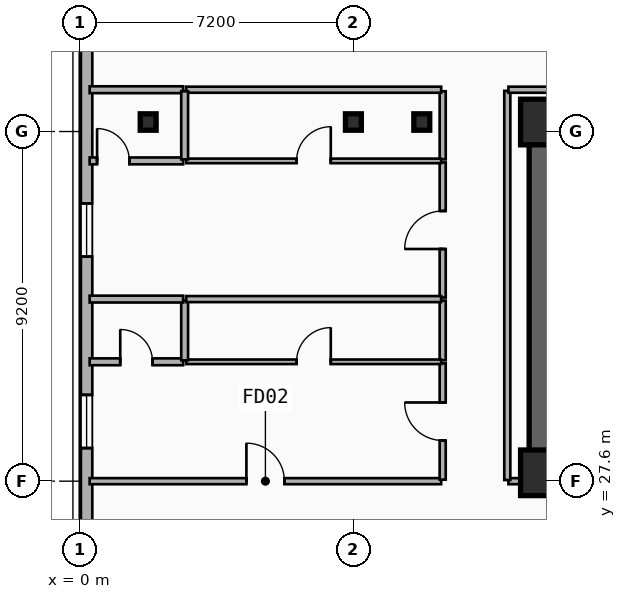
"""IFC4 building model, lengths in metres.
Left out: names, types, materials, properties, quantities, classifications, styles, units other than length and angle.
Written with IfcOpenShell. Run it as: python <this file> out.ifc"""

import sys

from ifc_helpers import new_model, si_unit, direction, frame, frame_2d, origin, origin_2d, place, context, subcontext, project, spatial, rectangle, i_section, extrude, element, fill, save


model = new_model("IFC4")
c1 = context("Model", 3, precision=1e-05, world=origin(), true_north=direction((0.0, 1.0)))
c2 = subcontext(c1, "Body", "Model", "MODEL_VIEW")
j1 = project(units=[si_unit("LENGTHUNIT", "METRE"), si_unit("PLANEANGLEUNIT", "RADIAN")], contexts=[c1])
p1 = place(None, origin())
s1 = spatial("IfcSite", under=j1, at=p1, CompositionType="ELEMENT")
p2 = place(p1, origin())
s2 = spatial("IfcBuilding", under=s1, at=p2, CompositionType="ELEMENT")
p3 = place(p2, frame((0.0, 0.0, 111.8)))
s3 = spatial("IfcBuildingStorey", under=s2, at=p3, CompositionType="ELEMENT", Elevation=111.8)
p4 = place(p3, frame((12.15, 37.05, 0.0), z_axis=(0.0, 0.0, 1.0), x_axis=(1.0, 0.0, 0.0)))
e1 = element("IfcWall", 1, at=p4, inside=s3, PredefinedType="SHEAR", context=c2, shape_type="SweptSolid", body=[
    extrude(rectangle(XDim=33.23, YDim=0.65, at=frame_2d((16.615, 0.0))), origin(), (0.0, 0.0, 1.0), 3.5),
])
p5 = place(p3, frame((21.18, 27.82, 0.0), z_axis=(0.0, 0.0, 1.0), x_axis=(-1.0, 0.0, 0.0)))
e2 = element("IfcWall", 2, at=p5, inside=s3, PredefinedType="SHEAR", context=c2, shape_type="SweptSolid", body=[
    extrude(rectangle(XDim=9.03, YDim=0.65, at=frame_2d((4.515, 0.0))), origin(), (0.0, 0.0, 1.0), 3.5),
])
p6 = place(p5, frame((2.68, 0.0, 0.0)))
e3 = element("IfcOpeningElement", 3, at=p6, cuts=e2, PredefinedType="OPENING", context=c2, shape_type="SweptSolid", body=[
    extrude(rectangle(XDim=1.1, YDim=2.15, at=frame_2d((0.55, 1.075))), frame((0.0, 0.335, 0.0), z_axis=(0.0, -1.0, 0.0), x_axis=(1.0, 0.0, 0.0)), (0.0, 0.0, 1.0), 0.67),
])
p7 = place(p3, frame((12.15, 28.145, 0.0), z_axis=(0.0, 0.0, 1.0), x_axis=(0.0, 1.0, 0.0)))
e4 = element("IfcWall", 4, at=p7, inside=s3, PredefinedType="SHEAR", context=c2, shape_type="SweptSolid", body=[
    extrude(rectangle(XDim=8.58, YDim=0.65, at=frame_2d((4.29, 0.0))), origin(), (0.0, 0.0, 1.0), 3.5),
])
for number, where, z_axis, x_axis in (
    (5, (12.2, 27.82, 0.0), (0.0, 0.0, 1.0), (1.0, 0.0, 0.0)),
    (6, (12.2, 37.05, 0.0), (0.0, 0.0, 1.0), (1.0, 0.0, 0.0)),
):
    element("IfcColumn", number, at=place(p3, frame(where, z_axis=z_axis, x_axis=x_axis)), inside=s3, PredefinedType="COLUMN", context=c2, shape_type="SweptSolid", body=[
        extrude(rectangle(XDim=1.2, YDim=1.2, at=origin_2d()), origin(), (0.0, 0.0, 1.0), 3.5),
    ])
for number, where, z_axis, x_axis in (
    (7, (9.0, 37.05, 0.0), (0.0, 0.0, 1.0), (1.0, 0.0, 0.0)),
    (8, (1.8, 37.05, 0.0), (0.0, 0.0, 1.0), (1.0, 0.0, 0.0)),
    (9, (7.2, 37.05, 0.0), (0.0, 0.0, 1.0), (1.0, 0.0, 0.0)),
):
    element("IfcColumn", number, at=place(p3, frame(where, z_axis=z_axis, x_axis=x_axis)), inside=s3, PredefinedType="COLUMN", context=c2, shape_type="SweptSolid", body=[
        extrude(i_section(OverallWidth=0.418, OverallDepth=0.432, WebThickness=0.035, FlangeThickness=0.056, FilletRadius=0.015, at=origin_2d()), origin(), (0.0, 0.0, 1.0), 3.5),
    ])
p8 = place(p3, frame((0.18, 21.0, 0.0), z_axis=(0.0, 0.0, 1.0), x_axis=(0.0, 1.0, 0.0)))
e10 = element("IfcWall", 10, at=p8, inside=s3, PredefinedType="SOLIDWALL", context=c2, shape_type="SweptSolid", body=[
    extrude(rectangle(XDim=18.0, YDim=0.3, at=frame_2d((9.0, 0.0))), origin(), (0.0, 0.0, 1.0), 3.24),
])
p9 = place(p8, frame((7.47, 0.0, 0.48)))
e11 = element("IfcOpeningElement", 11, at=p9, cuts=e10, PredefinedType="OPENING", context=c2, shape_type="SweptSolid", body=[
    extrude(rectangle(XDim=1.4, YDim=1.8, at=frame_2d((0.7, 0.9))), frame((0.0, 0.16, 0.0), z_axis=(0.0, -1.0, 0.0), x_axis=(1.0, 0.0, 0.0)), (0.0, 0.0, 1.0), 0.32),
])
p10 = place(p8, frame((12.509, 0.0, 0.48)))
e12 = element("IfcOpeningElement", 12, at=p10, cuts=e10, PredefinedType="OPENING", context=c2, shape_type="SweptSolid", body=[
    extrude(rectangle(XDim=1.4, YDim=1.8, at=frame_2d((0.7, 0.9))), frame((0.0, 0.16, 0.0), z_axis=(0.0, -1.0, 0.0), x_axis=(1.0, 0.0, 0.0)), (0.0, 0.0, 1.0), 0.32),
])
p11 = place(p8, frame((0.32, 0.0, 0.65)))
e13 = element("IfcOpeningElement", 13, at=p11, cuts=e10, PredefinedType="OPENING", context=c2, shape_type="SweptSolid", body=[
    extrude(rectangle(XDim=1.4, YDim=1.8, at=frame_2d((0.7, 0.9))), frame((0.0, 0.16, 0.0), z_axis=(0.0, -1.0, 0.0), x_axis=(1.0, 0.0, 0.0)), (0.0, 0.0, 1.0), 0.32),
])
p12 = place(p3, frame((0.26, 27.6, 0.0), z_axis=(0.0, 0.0, 1.0), x_axis=(1.0, 0.0, 0.0)))
e14 = element("IfcWall", 14, at=p12, inside=s3, PredefinedType="PARTITIONING", context=c2, shape_type="SweptSolid", body=[
    extrude(rectangle(XDim=9.25, YDim=0.16, at=frame_2d((4.625, 0.0))), origin(), (0.0, 0.0, 1.0), 2.57),
])
p13 = place(p12, frame((4.125, 0.0, 0.0)))
e15 = element("IfcOpeningElement", 15, at=p13, cuts=e14, PredefinedType="OPENING", context=c2, shape_type="SweptSolid", body=[
    extrude(rectangle(XDim=1.0, YDim=2.15, at=frame_2d((0.5, 1.075))), frame((0.0, 0.09, 0.0), z_axis=(0.0, -1.0, 0.0), x_axis=(1.0, 0.0, 0.0)), (0.0, 0.0, 1.0), 0.18),
])
p14 = place(p3, frame((9.55, 27.64, 0.0), z_axis=(0.0, 0.0, 1.0), x_axis=(0.0, 1.0, 0.0)))
e16 = element("IfcWall", 16, at=p14, inside=s3, PredefinedType="PARTITIONING", context=c2, shape_type="SweptSolid", body=[
    extrude(rectangle(XDim=3.061, YDim=0.16, at=frame_2d((1.531, 0.0))), origin(), (0.0, 0.0, 1.0), 3.24),
])
p15 = place(p14, frame((1.031, 0.0, 0.0)))
e17 = element("IfcOpeningElement", 17, at=p15, cuts=e16, PredefinedType="OPENING", context=c2, shape_type="SweptSolid", body=[
    extrude(rectangle(XDim=1.0, YDim=2.15, at=frame_2d((0.5, 1.075))), frame((0.0, 0.09, 0.0), z_axis=(0.0, -1.0, 0.0), x_axis=(1.0, 0.0, 0.0)), (0.0, 0.0, 1.0), 0.18),
])
p16 = place(p3, frame((9.55, 30.781, 0.0), z_axis=(0.0, 0.0, 1.0), x_axis=(0.0, 1.0, 0.0)))
e18 = element("IfcWall", 18, at=p16, inside=s3, PredefinedType="PARTITIONING", context=c2, shape_type="SweptSolid", body=[
    extrude(rectangle(XDim=1.57, YDim=0.16, at=frame_2d((0.785, 0.0))), origin(), (0.0, 0.0, 1.0), 3.24),
])
p17 = place(p3, frame((9.55, 32.431, 0.0), z_axis=(0.0, 0.0, 1.0), x_axis=(0.0, 1.0, 0.0)))
e19 = element("IfcWall", 19, at=p17, inside=s3, PredefinedType="PARTITIONING", context=c2, shape_type="SweptSolid", body=[
    extrude(rectangle(XDim=3.556, YDim=0.16, at=frame_2d((1.778, 0.0))), origin(), (0.0, 0.0, 1.0), 3.24),
])
p18 = place(p17, frame((1.278, 0.0, 0.0)))
e20 = element("IfcOpeningElement", 20, at=p18, cuts=e19, PredefinedType="OPENING", context=c2, shape_type="SweptSolid", body=[
    extrude(rectangle(XDim=1.0, YDim=2.15, at=frame_2d((0.5, 1.075))), frame((0.0, 0.09, 0.0), z_axis=(0.0, -1.0, 0.0), x_axis=(1.0, 0.0, 0.0)), (0.0, 0.0, 1.0), 0.18),
])
p19 = place(p3, frame((9.55, 36.067, 0.0), z_axis=(0.0, 0.0, 1.0), x_axis=(0.0, 1.0, 0.0)))
e21 = element("IfcWall", 21, at=p19, inside=s3, PredefinedType="PARTITIONING", context=c2, shape_type="SweptSolid", body=[
    extrude(rectangle(XDim=1.793, YDim=0.16, at=frame_2d((0.896, 0.0))), origin(), (0.0, 0.0, 1.0), 2.72),
])
p20 = place(p3, frame((0.26, 37.9, 0.0), z_axis=(0.0, 0.0, 1.0), x_axis=(1.0, 0.0, 0.0)))
e22 = element("IfcWall", 22, at=p20, inside=s3, PredefinedType="PLUMBINGWALL", context=c2, shape_type="SweptSolid", body=[
    extrude(rectangle(XDim=2.46, YDim=0.18, at=frame_2d((1.23, 0.0))), origin(), (0.0, 0.0, 1.0), 3.24),
])
p21 = place(p3, frame((2.8, 37.9, 0.0), z_axis=(0.0, 0.0, 1.0), x_axis=(1.0, 0.0, 0.0)))
e23 = element("IfcWall", 23, at=p21, inside=s3, PredefinedType="PARTITIONING", context=c2, shape_type="SweptSolid", body=[
    extrude(rectangle(XDim=6.71, YDim=0.16, at=frame_2d((3.355, 0.0))), origin(), (0.0, 0.0, 1.0), 3.24),
])
p22 = place(p3, frame((0.26, 30.741, 0.0), z_axis=(0.0, 0.0, 1.0), x_axis=(1.0, 0.0, 0.0)))
e24 = element("IfcWall", 24, at=p22, inside=s3, PredefinedType="PLUMBINGWALL", context=c2, shape_type="SweptSolid", body=[
    extrude(rectangle(XDim=2.46, YDim=0.18, at=frame_2d((1.23, 0.0))), origin(), (0.0, 0.0, 1.0), 2.57),
])
p23 = place(p22, frame((0.805, 0.0, 0.0)))
e25 = element("IfcOpeningElement", 25, at=p23, cuts=e24, PredefinedType="OPENING", context=c2, shape_type="SweptSolid", body=[
    extrude(rectangle(XDim=0.85, YDim=2.1, at=frame_2d((0.425, 1.05))), frame((0.0, 0.1, 0.0), z_axis=(0.0, -1.0, 0.0), x_axis=(1.0, 0.0, 0.0)), (0.0, 0.0, 1.0), 0.2),
])
p24 = place(p3, frame((2.8, 30.741, 0.0), z_axis=(0.0, 0.0, 1.0), x_axis=(1.0, 0.0, 0.0)))
e26 = element("IfcWall", 26, at=p24, inside=s3, PredefinedType="PARTITIONING", context=c2, shape_type="SweptSolid", body=[
    extrude(rectangle(XDim=6.71, YDim=0.12, at=frame_2d((3.355, 0.0))), origin(), (0.0, 0.0, 1.0), 2.57),
])
p25 = place(p24, frame((2.905, 0.0, 0.0)))
e27 = element("IfcOpeningElement", 27, at=p25, cuts=e26, PredefinedType="OPENING", context=c2, shape_type="SweptSolid", body=[
    extrude(rectangle(XDim=0.9, YDim=2.1, at=frame_2d((0.45, 1.05))), frame((0.0, 0.07, 0.0), z_axis=(0.0, -1.0, 0.0), x_axis=(1.0, 0.0, 0.0)), (0.0, 0.0, 1.0), 0.14),
])
p26 = place(p3, frame((2.76, 30.781, 0.0), z_axis=(0.0, 0.0, 1.0), x_axis=(0.0, 1.0, 0.0)))
e28 = element("IfcWall", 28, at=p26, inside=s3, PredefinedType="PLUMBINGWALL", context=c2, shape_type="SweptSolid", body=[
    extrude(rectangle(XDim=1.57, YDim=0.18, at=frame_2d((0.785, 0.0))), origin(), (0.0, 0.0, 1.0), 3.24),
])
p27 = place(p3, frame((0.26, 32.391, 0.0), z_axis=(0.0, 0.0, 1.0), x_axis=(1.0, 0.0, 0.0)))
e29 = element("IfcWall", 29, at=p27, inside=s3, PredefinedType="PLUMBINGWALL", context=c2, shape_type="SweptSolid", body=[
    extrude(rectangle(XDim=2.46, YDim=0.18, at=frame_2d((1.23, 0.0))), origin(), (0.0, 0.0, 1.0), 2.57),
])
p28 = place(p3, frame((2.8, 32.391, 0.0), z_axis=(0.0, 0.0, 1.0), x_axis=(1.0, 0.0, 0.0)))
e30 = element("IfcWall", 30, at=p28, inside=s3, PredefinedType="PARTITIONING", context=c2, shape_type="SweptSolid", body=[
    extrude(rectangle(XDim=6.71, YDim=0.16, at=frame_2d((3.355, 0.0))), origin(), (0.0, 0.0, 1.0), 2.57),
])
p29 = place(p3, frame((0.26, 36.027, 0.0), z_axis=(0.0, 0.0, 1.0), x_axis=(1.0, 0.0, 0.0)))
e31 = element("IfcWall", 31, at=p29, inside=s3, PredefinedType="PLUMBINGWALL", context=c2, shape_type="SweptSolid", body=[
    extrude(rectangle(XDim=2.46, YDim=0.18, at=frame_2d((1.23, 0.0))), origin(), (0.0, 0.0, 1.0), 2.57),
])
p30 = place(p29, frame((0.195, 0.0, 0.0)))
e32 = element("IfcOpeningElement", 32, at=p30, cuts=e31, PredefinedType="OPENING", context=c2, shape_type="SweptSolid", body=[
    extrude(rectangle(XDim=0.85, YDim=2.1, at=frame_2d((0.425, 1.05))), frame((0.0, 0.1, 0.0), z_axis=(0.0, -1.0, 0.0), x_axis=(1.0, 0.0, 0.0)), (0.0, 0.0, 1.0), 0.2),
])
p31 = place(p3, frame((2.8, 36.027, 0.0), z_axis=(0.0, 0.0, 1.0), x_axis=(1.0, 0.0, 0.0)))
e33 = element("IfcWall", 33, at=p31, inside=s3, PredefinedType="PARTITIONING", context=c2, shape_type="SweptSolid", body=[
    extrude(rectangle(XDim=6.71, YDim=0.12, at=frame_2d((3.355, 0.0))), origin(), (0.0, 0.0, 1.0), 2.57),
])
p32 = place(p31, frame((2.905, 0.0, 0.0)))
e34 = element("IfcOpeningElement", 34, at=p32, cuts=e33, PredefinedType="OPENING", context=c2, shape_type="SweptSolid", body=[
    extrude(rectangle(XDim=0.9, YDim=2.1, at=frame_2d((0.45, 1.05))), frame((0.0, 0.07, 0.0), z_axis=(0.0, -1.0, 0.0), x_axis=(1.0, 0.0, 0.0)), (0.0, 0.0, 1.0), 0.14),
])
p33 = place(p3, frame((2.76, 36.067, 0.0), z_axis=(0.0, 0.0, 1.0), x_axis=(0.0, 1.0, 0.0)))
e35 = element("IfcWall", 35, at=p33, inside=s3, PredefinedType="PLUMBINGWALL", context=c2, shape_type="SweptSolid", body=[
    extrude(rectangle(XDim=1.793, YDim=0.18, at=frame_2d((0.896, 0.0))), origin(), (0.0, 0.0, 1.0), 2.72),
])
p34 = place(p3, frame((11.28, 27.6, 0.0), z_axis=(0.0, 0.0, 1.0), x_axis=(1.0, 0.0, 0.0)))
e36 = element("IfcWall", 36, at=p34, inside=s3, PredefinedType="PARTITIONING", context=c2, shape_type="SweptSolid", body=[
    extrude(rectangle(XDim=0.84, YDim=0.16, at=frame_2d((0.42, 0.0))), origin(), (0.0, 0.0, 1.0), 2.28),
])
p35 = place(p3, frame((11.25, 27.63, 0.0), z_axis=(0.0, 0.0, 1.0), x_axis=(0.0, 1.0, 0.0)))
e37 = element("IfcWall", 37, at=p35, inside=s3, PredefinedType="PARTITIONING", context=c2, shape_type="SweptSolid", body=[
    extrude(rectangle(XDim=10.24, YDim=0.16, at=frame_2d((5.12, 0.0))), origin(), (0.0, 0.0, 1.0), 2.72),
])
p36 = place(p3, frame((11.28, 37.9, 0.0), z_axis=(0.0, 0.0, 1.0), x_axis=(1.0, 0.0, 0.0)))
e38 = element("IfcWall", 38, at=p36, inside=s3, PredefinedType="PARTITIONING", context=c2, shape_type="SweptSolid", body=[
    extrude(rectangle(XDim=35.04, YDim=0.16, at=frame_2d((17.52, 0.0))), origin(), (0.0, 0.0, 1.0), 3.24),
])
p37 = place(p9, origin())
e39 = element("IfcWindow", 39, at=p37, inside=s3, PartitioningType="SINGLE_PANEL", PredefinedType="WINDOW", context=c2, shape_type="SweptSolid", body=[
    extrude(rectangle(XDim=1.4, YDim=1.8, at=frame_2d((0.7, 0.9))), frame((0.0, 0.03, 0.0), z_axis=(0.0, -1.0, 0.0), x_axis=(1.0, 0.0, 0.0)), (0.0, 0.0, 1.0), 0.06),
])
fill(e11, e39)
p38 = place(p10, origin())
e40 = element("IfcWindow", 40, at=p38, inside=s3, PartitioningType="SINGLE_PANEL", PredefinedType="WINDOW", context=c2, shape_type="SweptSolid", body=[
    extrude(rectangle(XDim=1.4, YDim=1.8, at=frame_2d((0.7, 0.9))), frame((0.0, 0.03, 0.0), z_axis=(0.0, -1.0, 0.0), x_axis=(1.0, 0.0, 0.0)), (0.0, 0.0, 1.0), 0.06),
])
fill(e12, e40)
p39 = place(p13, origin())
e41 = element("IfcDoor", 41, at=p39, inside=s3, OperationType="SINGLE_SWING_LEFT", PredefinedType="DOOR", context=c2, shape_type="SweptSolid", body=[
    extrude(rectangle(XDim=1.0, YDim=2.15, at=frame_2d((0.5, 1.075))), frame((0.0, 0.025, 0.0), z_axis=(0.0, -1.0, 0.0), x_axis=(1.0, 0.0, 0.0)), (0.0, 0.0, 1.0), 0.05),
])
fill(e15, e41)
p40 = place(p15, origin())
e42 = element("IfcDoor", 42, at=p40, inside=s3, OperationType="SINGLE_SWING_RIGHT", PredefinedType="DOOR", context=c2, shape_type="SweptSolid", body=[
    extrude(rectangle(XDim=1.0, YDim=2.15, at=frame_2d((0.5, 1.075))), frame((0.0, 0.025, 0.0), z_axis=(0.0, -1.0, 0.0), x_axis=(1.0, 0.0, 0.0)), (0.0, 0.0, 1.0), 0.05),
])
fill(e17, e42)
p41 = place(p18, origin())
e43 = element("IfcDoor", 43, at=p41, inside=s3, OperationType="SINGLE_SWING_LEFT", PredefinedType="DOOR", context=c2, shape_type="SweptSolid", body=[
    extrude(rectangle(XDim=1.0, YDim=2.15, at=frame_2d((0.5, 1.075))), frame((0.0, 0.025, 0.0), z_axis=(0.0, -1.0, 0.0), x_axis=(1.0, 0.0, 0.0)), (0.0, 0.0, 1.0), 0.05),
])
fill(e20, e43)
p42 = place(p23, origin())
e44 = element("IfcDoor", 44, at=p42, inside=s3, OperationType="SINGLE_SWING_LEFT", PredefinedType="DOOR", context=c2, shape_type="SweptSolid", body=[
    extrude(rectangle(XDim=0.85, YDim=2.1, at=frame_2d((0.425, 1.05))), frame((0.0, 0.025, 0.0), z_axis=(0.0, -1.0, 0.0), x_axis=(1.0, 0.0, 0.0)), (0.0, 0.0, 1.0), 0.05),
])
fill(e25, e44)
p43 = place(p25, origin())
e45 = element("IfcDoor", 45, at=p43, inside=s3, OperationType="SINGLE_SWING_RIGHT", PredefinedType="DOOR", context=c2, shape_type="SweptSolid", body=[
    extrude(rectangle(XDim=0.9, YDim=2.1, at=frame_2d((0.45, 1.05))), frame((0.0, 0.025, 0.0), z_axis=(0.0, -1.0, 0.0), x_axis=(1.0, 0.0, 0.0)), (0.0, 0.0, 1.0), 0.05),
])
fill(e27, e45)
p44 = place(p30, origin())
e46 = element("IfcDoor", 46, at=p44, inside=s3, OperationType="SINGLE_SWING_LEFT", PredefinedType="DOOR", context=c2, shape_type="SweptSolid", body=[
    extrude(rectangle(XDim=0.85, YDim=2.1, at=frame_2d((0.425, 1.05))), frame((0.0, 0.025, 0.0), z_axis=(0.0, -1.0, 0.0), x_axis=(1.0, 0.0, 0.0)), (0.0, 0.0, 1.0), 0.05),
])
fill(e32, e46)
p45 = place(p32, origin())
e47 = element("IfcDoor", 47, at=p45, inside=s3, OperationType="SINGLE_SWING_RIGHT", PredefinedType="DOOR", context=c2, shape_type="SweptSolid", body=[
    extrude(rectangle(XDim=0.9, YDim=2.1, at=frame_2d((0.45, 1.05))), frame((0.0, 0.025, 0.0), z_axis=(0.0, -1.0, 0.0), x_axis=(1.0, 0.0, 0.0)), (0.0, 0.0, 1.0), 0.05),
])
fill(e34, e47)
save(model, sys.argv[1])
